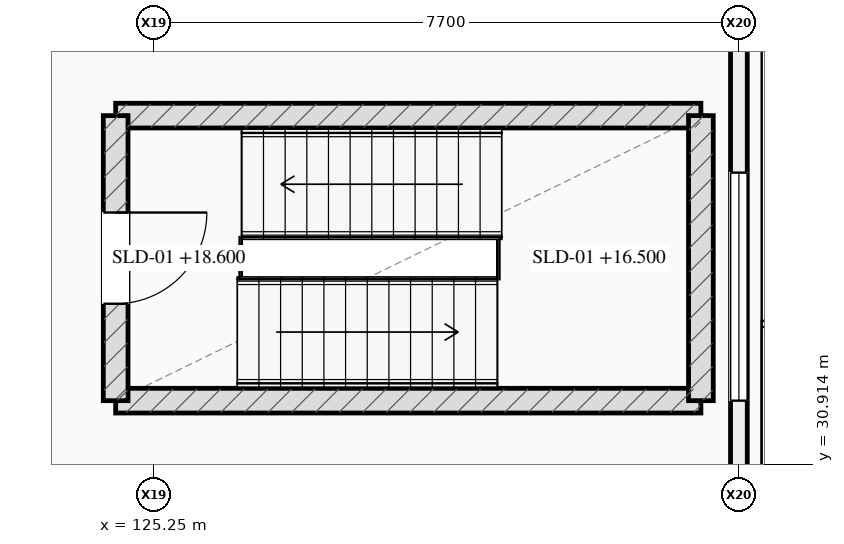
"""IFC4 building model, lengths in metres.
Left out: names, types, materials, properties, quantities, classifications, styles, units other than length and angle.
Written with IfcOpenShell. Run it as: python <this file> out.ifc"""

import sys

from ifc_helpers import new_model, si_unit, direction, frame, frame_2d, origin, place, context, subcontext, project, spatial, rectangle, extrude, element, fill, save


model = new_model("IFC4")
c1 = context("Model", 3, precision=1e-05, world=origin(), true_north=direction((0.0, 1.0)))
c2 = subcontext(c1, "Body", "Model", "MODEL_VIEW")
j1 = project(units=[si_unit("LENGTHUNIT", "METRE"), si_unit("PLANEANGLEUNIT", "RADIAN")], contexts=[c1])
p1 = place(None, origin())
s1 = spatial("IfcSite", under=j1, at=p1, CompositionType="ELEMENT")
p2 = place(p1, origin())
s2 = spatial("IfcBuilding", under=s1, at=p2, CompositionType="ELEMENT")
p3 = place(p2, frame((0.0, 0.0, 14.4)))
s3 = spatial("IfcBuildingStorey", under=s2, at=p3, CompositionType="ELEMENT", Elevation=14.4)
p4 = place(p3, frame((132.95, 36.45, 0.0), z_axis=(0.0, 0.0, 1.0), x_axis=(0.0, -1.0, 0.0)))
e1 = element("IfcWall", 1, at=p4, inside=s3, PredefinedType="STANDARD", context=c2, shape_type="SweptSolid", body=[
    extrude(rectangle(XDim=6.4, YDim=0.22, at=frame_2d((3.2, 0.0))), origin(), (0.0, 0.0, 1.0), 3.28),
])
p5 = place(p4, frame((1.7, 0.0, 0.88)))
e2 = element("IfcOpeningElement", 2, at=p5, cuts=e1, PredefinedType="OPENING", context=c2, shape_type="SweptSolid", body=[
    extrude(rectangle(XDim=3.0, YDim=1.45, at=frame_2d((1.5, 0.725))), frame((0.0, 0.12, 0.0), z_axis=(0.0, -1.0, 0.0), x_axis=(1.0, 0.0, 0.0)), (0.0, 0.0, 1.0), 0.24),
])
for number, where, z_axis, x_axis in (
    (3, (124.75, 31.75, 0.0), (0.0, 0.0, 1.0), (1.0, 0.0, 0.0)),
    (4, (132.45, 35.5, 0.0), (0.0, 0.0, 1.0), (-1.0, 0.0, 0.0)),
):
    element("IfcWall", number, at=place(p3, frame(where, z_axis=z_axis, x_axis=x_axis)), inside=s3, PredefinedType="SHEAR", context=c2, shape_type="SweptSolid", body=[
        extrude(rectangle(XDim=7.7, YDim=0.325, at=frame_2d((3.85, 0.0))), origin(), (0.0, 0.0, 1.0), 3.99),
    ])
p6 = place(p3, frame((124.75, 35.5, 0.0), z_axis=(0.0, 0.0, 1.0), x_axis=(0.0, -1.0, 0.0)))
e5 = element("IfcWall", 5, at=p6, inside=s3, PredefinedType="SHEAR", context=c2, shape_type="SweptSolid", body=[
    extrude(rectangle(XDim=3.75, YDim=0.325, at=frame_2d((1.875, 0.0))), origin(), (0.0, 0.0, 1.0), 3.99),
])
p7 = place(p6, frame((1.275, 0.0, 0.0)))
e6 = element("IfcOpeningElement", 6, at=p7, cuts=e5, PredefinedType="OPENING", context=c2, shape_type="SweptSolid", body=[
    extrude(rectangle(XDim=1.2, YDim=2.2, at=frame_2d((0.6, 1.1))), frame((0.0, 0.172, 0.0), z_axis=(0.0, -1.0, 0.0), x_axis=(1.0, 0.0, 0.0)), (0.0, 0.0, 1.0), 0.345),
])
p8 = place(p3, frame((132.45, 31.75, 0.0), z_axis=(0.0, 0.0, 1.0), x_axis=(0.0, 1.0, 0.0)))
e7 = element("IfcWall", 7, at=p8, inside=s3, PredefinedType="SHEAR", context=c2, shape_type="SweptSolid", body=[
    extrude(rectangle(XDim=3.75, YDim=0.325, at=frame_2d((1.875, 0.0))), origin(), (0.0, 0.0, 1.0), 3.99),
])
p9 = place(p5, origin())
e8 = element("IfcWindow", 8, at=p9, inside=s3, PartitioningType="SINGLE_PANEL", PredefinedType="WINDOW", context=c2, shape_type="SweptSolid", body=[
    extrude(rectangle(XDim=3.0, YDim=1.45, at=frame_2d((1.5, 0.725))), frame((0.0, 0.03, 0.0), z_axis=(0.0, -1.0, 0.0), x_axis=(1.0, 0.0, 0.0)), (0.0, 0.0, 1.0), 0.06),
])
fill(e2, e8)
p10 = place(p7, origin())
e9 = element("IfcDoor", 9, at=p10, inside=s3, OperationType="SINGLE_SWING_LEFT", PredefinedType="DOOR", context=c2, shape_type="SweptSolid", body=[
    extrude(rectangle(XDim=1.2, YDim=2.2, at=frame_2d((0.6, 1.1))), frame((0.0, 0.025, 0.0), z_axis=(0.0, -1.0, 0.0), x_axis=(1.0, 0.0, 0.0)), (0.0, 0.0, 1.0), 0.05),
])
fill(e6, e9)
save(model, sys.argv[1])
